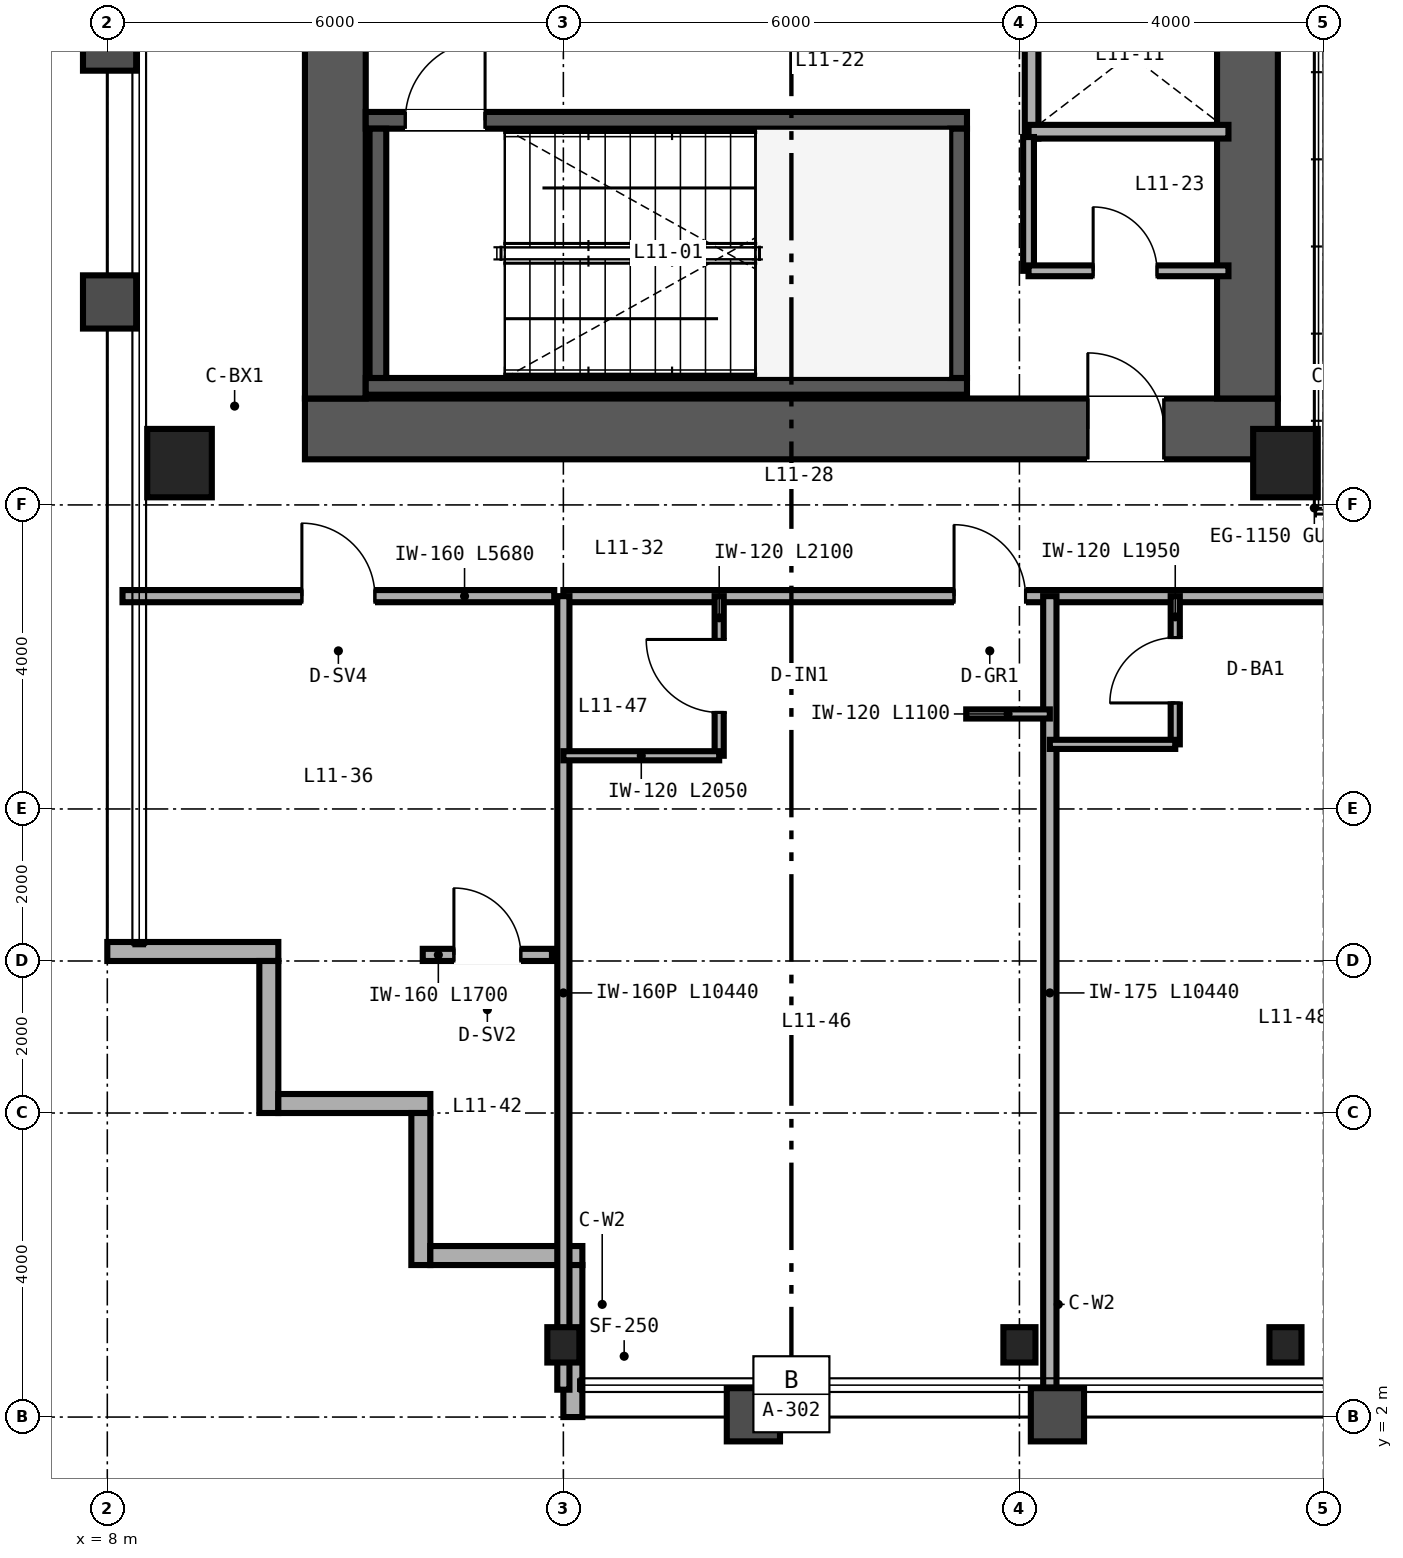
"""IFC4 building model, lengths in metres.
Left out: names, types, materials, properties, quantities, classifications, styles, units other than length and angle.
Written with IfcOpenShell. Run it as: python <this file> out.ifc"""

import sys

from ifc_helpers import new_model, si_unit, direction, frame, frame_2d, origin, origin_2d, place, context, subcontext, project, spatial, rectangle, hollow_rectangle, i_section, extrude, source, transform, mapped, element, fill, save


model = new_model("IFC4")
c1 = context("Model", 3, precision=1e-05, world=origin(), true_north=direction((0.0, 1.0)))
c2 = subcontext(c1, "Body", "Model", "MODEL_VIEW")
j1 = project(units=[si_unit("LENGTHUNIT", "METRE"), si_unit("PLANEANGLEUNIT", "RADIAN")], contexts=[c1])
p1 = place(None, origin())
s1 = spatial("IfcSite", under=j1, at=p1, CompositionType="ELEMENT")
p2 = place(p1, origin())
s2 = spatial("IfcBuilding", under=s1, at=p2, CompositionType="ELEMENT")
p3 = place(p2, frame((0.0, 0.0, 49.2)))
s3 = spatial("IfcBuildingStorey", under=s2, at=p3, CompositionType="ELEMENT", Elevation=49.2)
p4 = place(p3, frame((10.6, 15.0, 0.0), z_axis=(0.0, 0.0, 1.0), x_axis=(1.0, 0.0, 0.0)))
e1 = element("IfcWall", 1, at=p4, inside=s3, PredefinedType="SHEAR", context=c2, shape_type="SweptSolid", body=[
    extrude(rectangle(XDim=12.8, YDim=0.8, at=frame_2d((6.4, 0.0))), origin(), (0.0, 0.0, 1.0), 3.35),
])
p5 = place(p4, frame((10.3, 0.0, 0.0)))
e2 = element("IfcOpeningElement", 2, at=p5, cuts=e1, PredefinedType="OPENING", context=c2, shape_type="SweptSolid", body=[
    extrude(rectangle(XDim=1.0, YDim=2.15, at=frame_2d((0.5, 1.075))), frame((0.0, 0.41, 0.0), z_axis=(0.0, -1.0, 0.0), x_axis=(1.0, 0.0, 0.0)), (0.0, 0.0, 1.0), 0.82),
])
for number, where, z_axis, x_axis in (
    (3, (11.0, 15.4, 0.0), (0.0, 0.0, 1.0), (0.0, 1.0, 0.0)),
    (4, (23.0, 15.4, 0.0), (0.0, 0.0, 1.0), (0.0, 1.0, 0.0)),
):
    element("IfcWall", number, at=place(p3, frame(where, z_axis=z_axis, x_axis=x_axis)), inside=s3, PredefinedType="SHEAR", context=c2, shape_type="SweptSolid", body=[
        extrude(rectangle(XDim=21.2, YDim=0.8, at=frame_2d((10.6, 0.0))), origin(), (0.0, 0.0, 1.0), 3.35),
    ])
p6 = place(p3, frame((11.4, 15.56, 0.0), z_axis=(0.0, 0.0, 1.0), x_axis=(1.0, 0.0, 0.0)))
e5 = element("IfcWall", 5, at=p6, inside=s3, PredefinedType="SHEAR", context=c2, shape_type="SweptSolid", body=[
    extrude(rectangle(XDim=7.91, YDim=0.22, at=frame_2d((3.955, 0.0))), origin(), (0.0, 0.0, 1.0), 3.4),
])
p7 = place(p3, frame((11.4, 19.06, 0.0), z_axis=(0.0, 0.0, 1.0), x_axis=(1.0, 0.0, 0.0)))
e6 = element("IfcWall", 6, at=p7, inside=s3, PredefinedType="SHEAR", context=c2, shape_type="SweptSolid", body=[
    extrude(rectangle(XDim=7.91, YDim=0.22, at=frame_2d((3.955, 0.0))), origin(), (0.0, 0.0, 1.0), 3.4),
])
p8 = place(p7, frame((0.52, 0.0, 0.0)))
e7 = element("IfcOpeningElement", 7, at=p8, cuts=e6, PredefinedType="OPENING", context=c2, shape_type="SweptSolid", body=[
    extrude(rectangle(XDim=1.05, YDim=2.15, at=frame_2d((0.525, 1.075))), frame((0.0, 0.12, 0.0), z_axis=(0.0, -1.0, 0.0), x_axis=(1.0, 0.0, 0.0)), (0.0, 0.0, 1.0), 0.24),
])
for number, where, z_axis, x_axis in (
    (8, (11.56, 15.67, 0.0), (0.0, 0.0, 1.0), (0.0, 1.0, 0.0)),
    (9, (19.2, 15.67, 0.0), (0.0, 0.0, 1.0), (0.0, 1.0, 0.0)),
):
    element("IfcWall", number, at=place(p3, frame(where, z_axis=z_axis, x_axis=x_axis)), inside=s3, PredefinedType="SHEAR", context=c2, shape_type="SweptSolid", body=[
        extrude(rectangle(XDim=3.28, YDim=0.22, at=frame_2d((1.64, 0.0))), origin(), (0.0, 0.0, 1.0), 3.4),
    ])
m1 = source(origin(), c2, "Body", "SweptSolid", [
    extrude(hollow_rectangle(XDim=0.85, YDim=0.9, WallThickness=0.04, at=origin_2d()), origin(), (0.0, 0.0, 1.0), 3.35),
])
for number, where, z_axis, x_axis in (
    (10, (8.95, 14.55, 0.0), (0.0, 0.0, 1.0), (1.0, 0.0, 0.0)),
    (11, (23.5, 14.55, 0.0), (0.0, 0.0, 1.0), (1.0, 0.0, 0.0)),
):
    element("IfcColumn", number, at=place(p3, frame(where, z_axis=z_axis, x_axis=x_axis)), inside=s3, PredefinedType="COLUMN", context=c2, shape_type="MappedRepresentation", body=[
        mapped(m1, transform((0.0, 0.0, 0.0), scale=1.0)),
    ])
m2 = source(origin(), c2, "Body", "SweptSolid", [
    extrude(i_section(OverallWidth=0.422, OverallDepth=0.465, WebThickness=0.045, FlangeThickness=0.073, FilletRadius=0.025, at=origin_2d()), origin(), (0.0, 0.0, 1.0), 3.35),
])
for number, where, z_axis, x_axis in (
    (12, (14.0, 2.95, 0.0), (0.0, 0.0, 1.0), (1.0, 0.0, 0.0)),
    (13, (20.0, 2.95, 0.0), (0.0, 0.0, 1.0), (1.0, 0.0, 0.0)),
    (14, (23.5, 2.95, 0.0), (0.0, 0.0, 1.0), (1.0, 0.0, 0.0)),
):
    element("IfcColumn", number, at=place(p3, frame(where, z_axis=z_axis, x_axis=x_axis)), inside=s3, PredefinedType="COLUMN", context=c2, shape_type="MappedRepresentation", body=[
        mapped(m2, transform((0.0, 0.0, 0.0), scale=1.0)),
    ])
p9 = place(p3, frame((8.0, 8.125, 0.0), z_axis=(0.0, 0.0, 1.0), x_axis=(1.0, 0.0, 0.0)))
e15 = element("IfcWall", 15, at=p9, inside=s3, PredefinedType="SOLIDWALL", context=c2, shape_type="SweptSolid", body=[
    extrude(rectangle(XDim=2.25, YDim=0.25, at=frame_2d((1.125, 0.0))), origin(), (0.0, 0.0, 1.0), 3.35),
])
for number, where, z_axis, x_axis in (
    (16, (10.125, 8.0, 0.0), (0.0, 0.0, 1.0), (0.0, -1.0, 0.0)),
    (17, (10.25, 6.125, 0.0), (0.0, 0.0, 1.0), (1.0, 0.0, 0.0)),
    (18, (12.125, 6.0, 0.0), (0.0, 0.0, 1.0), (0.0, -1.0, 0.0)),
    (19, (12.25, 4.125, 0.0), (0.0, 0.0, 1.0), (1.0, 0.0, 0.0)),
):
    element("IfcWall", number, at=place(p3, frame(where, z_axis=z_axis, x_axis=x_axis)), inside=s3, PredefinedType="SOLIDWALL", context=c2, shape_type="SweptSolid", body=[
        extrude(rectangle(XDim=2.0, YDim=0.25, at=frame_2d((1.0, 0.0))), origin(), (0.0, 0.0, 1.0), 3.35),
    ])
p10 = place(p3, frame((14.125, 4.0, 0.0), z_axis=(0.0, 0.0, 1.0), x_axis=(0.0, -1.0, 0.0)))
e20 = element("IfcWall", 20, at=p10, inside=s3, PredefinedType="SOLIDWALL", context=c2, shape_type="SweptSolid", body=[
    extrude(rectangle(XDim=2.0, YDim=0.25, at=frame_2d((1.0, 0.0))), origin(), (0.0, 0.0, 1.0), 2.657),
])
p11 = place(p3, frame((20.16, 18.82, 0.0), z_axis=(0.0, 0.0, 1.0), x_axis=(0.0, 1.0, 0.0)))
e21 = element("IfcWall", 21, at=p11, inside=s3, PredefinedType="SOLIDWALL", context=c2, shape_type="SweptSolid", body=[
    extrude(rectangle(XDim=6.32, YDim=0.18, at=frame_2d((3.16, 0.0))), origin(), (0.0, 0.0, 1.0), 2.36),
])
p12 = place(p3, frame((20.12, 18.91, 0.0), z_axis=(0.0, 0.0, 1.0), x_axis=(1.0, 0.0, 0.0)))
e22 = element("IfcWall", 22, at=p12, inside=s3, PredefinedType="SOLIDWALL", context=c2, shape_type="SweptSolid", body=[
    extrude(rectangle(XDim=2.63, YDim=0.18, at=frame_2d((1.315, 0.0))), origin(), (0.0, 0.0, 1.0), 3.35),
])
p13 = place(p3, frame((20.12, 17.08, 0.0), z_axis=(0.0, 0.0, 1.0), x_axis=(0.0, 1.0, 0.0)))
e23 = element("IfcWall", 23, at=p13, inside=s3, PredefinedType="PARTITIONING", context=c2, shape_type="SweptSolid", body=[
    extrude(rectangle(XDim=1.76, YDim=0.142, at=frame_2d((0.88, 0.0))), origin(), (0.0, 0.0, 1.0), 3.35),
])
p14 = place(p3, frame((20.12, 17.08, 0.0), z_axis=(0.0, 0.0, 1.0), x_axis=(1.0, 0.0, 0.0)))
e24 = element("IfcWall", 24, at=p14, inside=s3, PredefinedType="PARTITIONING", context=c2, shape_type="SweptSolid", body=[
    extrude(rectangle(XDim=2.63, YDim=0.142, at=frame_2d((1.315, 0.0))), origin(), (0.0, 0.0, 1.0), 3.35),
])
p15 = place(p14, frame((0.85, 0.0, 0.0)))
e25 = element("IfcOpeningElement", 25, at=p15, cuts=e24, PredefinedType="OPENING", context=c2, shape_type="SweptSolid", body=[
    extrude(rectangle(XDim=0.84, YDim=2.1, at=frame_2d((0.42, 1.05))), frame((0.0, 0.081, 0.0), z_axis=(0.0, -1.0, 0.0), x_axis=(1.0, 0.0, 0.0)), (0.0, 0.0, 1.0), 0.162),
])
p16 = place(p3, frame((8.2, 12.8, 0.0), z_axis=(0.0, 0.0, 1.0), x_axis=(1.0, 0.0, 0.0)))
e26 = element("IfcWall", 26, at=p16, inside=s3, PredefinedType="PARTITIONING", context=c2, shape_type="SweptSolid", body=[
    extrude(rectangle(XDim=5.68, YDim=0.16, at=frame_2d((2.84, 0.0))), origin(), (0.0, 0.0, 1.0), 3.35),
])
p17 = place(p16, frame((2.36, 0.0, 0.0)))
e27 = element("IfcOpeningElement", 27, at=p17, cuts=e26, PredefinedType="OPENING", context=c2, shape_type="SweptSolid", body=[
    extrude(rectangle(XDim=0.96, YDim=2.15, at=frame_2d((0.48, 1.075))), frame((0.0, 0.09, 0.0), z_axis=(0.0, -1.0, 0.0), x_axis=(1.0, 0.0, 0.0)), (0.0, 0.0, 1.0), 0.18),
])
p18 = place(p3, frame((12.15, 8.08, 0.0), z_axis=(0.0, 0.0, 1.0), x_axis=(1.0, 0.0, 0.0)))
e28 = element("IfcWall", 28, at=p18, inside=s3, PredefinedType="PARTITIONING", context=c2, shape_type="SweptSolid", body=[
    extrude(rectangle(XDim=1.7, YDim=0.16, at=frame_2d((0.85, 0.0))), origin(), (0.0, 0.0, 1.0), 3.35),
])
p19 = place(p18, frame((0.41, 0.0, 0.0)))
e29 = element("IfcOpeningElement", 29, at=p19, cuts=e28, PredefinedType="OPENING", context=c2, shape_type="SweptSolid", body=[
    extrude(rectangle(XDim=0.88, YDim=2.15, at=frame_2d((0.44, 1.075))), frame((0.0, 0.09, 0.0), z_axis=(0.0, -1.0, 0.0), x_axis=(1.0, 0.0, 0.0)), (0.0, 0.0, 1.0), 0.18),
])
p20 = place(p3, frame((14.0, 12.8, 0.0), z_axis=(0.0, 0.0, 1.0), x_axis=(1.0, 0.0, 0.0)))
e30 = element("IfcWall", 30, at=p20, inside=s3, PredefinedType="PARTITIONING", context=c2, shape_type="SweptSolid", body=[
    extrude(rectangle(XDim=36.0, YDim=0.16, at=frame_2d((18.0, 0.0))), origin(), (0.0, 0.0, 1.0), 2.571),
])
p21 = place(p20, frame((5.14, 0.0, 0.0)))
e31 = element("IfcOpeningElement", 31, at=p21, cuts=e30, PredefinedType="OPENING", context=c2, shape_type="SweptSolid", body=[
    extrude(rectangle(XDim=0.94, YDim=2.15, at=frame_2d((0.47, 1.075))), frame((0.0, 0.09, 0.0), z_axis=(0.0, -1.0, 0.0), x_axis=(1.0, 0.0, 0.0)), (0.0, 0.0, 1.0), 0.18),
])
p22 = place(p20, frame((11.34, 0.0, 0.0)))
e32 = element("IfcOpeningElement", 32, at=p22, cuts=e30, PredefinedType="OPENING", context=c2, shape_type="SweptSolid", body=[
    extrude(rectangle(XDim=0.94, YDim=2.15, at=frame_2d((0.47, 1.075))), frame((0.0, 0.09, 0.0), z_axis=(0.0, -1.0, 0.0), x_axis=(1.0, 0.0, 0.0)), (0.0, 0.0, 1.0), 0.18),
])
p23 = place(p20, frame((17.94, 0.0, 0.0)))
e33 = element("IfcOpeningElement", 33, at=p23, cuts=e30, PredefinedType="OPENING", context=c2, shape_type="SweptSolid", body=[
    extrude(rectangle(XDim=0.94, YDim=2.15, at=frame_2d((0.47, 1.075))), frame((0.0, 0.09, 0.0), z_axis=(0.0, -1.0, 0.0), x_axis=(1.0, 0.0, 0.0)), (0.0, 0.0, 1.0), 0.18),
])
p24 = place(p20, frame((21.82, 0.0, 0.0)))
e34 = element("IfcOpeningElement", 34, at=p24, cuts=e30, PredefinedType="OPENING", context=c2, shape_type="SweptSolid", body=[
    extrude(rectangle(XDim=0.96, YDim=2.15, at=frame_2d((0.48, 1.075))), frame((0.0, 0.09, 0.0), z_axis=(0.0, -1.0, 0.0), x_axis=(1.0, 0.0, 0.0)), (0.0, 0.0, 1.0), 0.18),
])
p25 = place(p20, frame((29.54, 0.0, 0.0)))
e35 = element("IfcOpeningElement", 35, at=p25, cuts=e30, PredefinedType="OPENING", context=c2, shape_type="SweptSolid", body=[
    extrude(rectangle(XDim=0.94, YDim=2.15, at=frame_2d((0.47, 1.075))), frame((0.0, 0.09, 0.0), z_axis=(0.0, -1.0, 0.0), x_axis=(1.0, 0.0, 0.0)), (0.0, 0.0, 1.0), 0.18),
])
p26 = place(p20, frame((32.92, 0.0, 0.0)))
e36 = element("IfcOpeningElement", 36, at=p26, cuts=e30, PredefinedType="OPENING", context=c2, shape_type="SweptSolid", body=[
    extrude(rectangle(XDim=0.96, YDim=2.15, at=frame_2d((0.48, 1.075))), frame((0.0, 0.09, 0.0), z_axis=(0.0, -1.0, 0.0), x_axis=(1.0, 0.0, 0.0)), (0.0, 0.0, 1.0), 0.18),
])
p27 = place(p3, frame((14.0, 2.36, 0.0), z_axis=(0.0, 0.0, 1.0), x_axis=(0.0, 1.0, 0.0)))
e37 = element("IfcWall", 37, at=p27, inside=s3, PredefinedType="PARTITIONING", context=c2, shape_type="SweptSolid", body=[
    extrude(rectangle(XDim=10.44, YDim=0.16, at=frame_2d((5.22, 0.0))), origin(), (0.0, 0.0, 1.0), 2.657),
])
p28 = place(p3, frame((20.4, 2.36, 0.0), z_axis=(0.0, 0.0, 1.0), x_axis=(0.0, 1.0, 0.0)))
e38 = element("IfcWall", 38, at=p28, inside=s3, PredefinedType="PARTITIONING", context=c2, shape_type="SweptSolid", body=[
    extrude(rectangle(XDim=10.44, YDim=0.175, at=frame_2d((5.22, 0.0))), origin(), (0.0, 0.0, 1.0), 2.813),
])
p29 = place(p3, frame((16.05, 10.7, 0.0), z_axis=(0.0, 0.0, 1.0), x_axis=(0.0, 1.0, 0.0)))
e39 = element("IfcWall", 39, at=p29, inside=s3, PredefinedType="PARTITIONING", context=c2, shape_type="SweptSolid", body=[
    extrude(rectangle(XDim=2.1, YDim=0.12, at=frame_2d((1.05, 0.0))), origin(), (0.0, 0.0, 1.0), 3.35),
])
p30 = place(p29, frame((0.57, 0.0, 0.0)))
e40 = element("IfcOpeningElement", 40, at=p30, cuts=e39, PredefinedType="OPENING", context=c2, shape_type="SweptSolid", body=[
    extrude(rectangle(XDim=0.96, YDim=2.15, at=frame_2d((0.48, 1.075))), frame((0.0, 0.07, 0.0), z_axis=(0.0, -1.0, 0.0), x_axis=(1.0, 0.0, 0.0)), (0.0, 0.0, 1.0), 0.14),
])
p31 = place(p3, frame((14.0, 10.7, 0.0), z_axis=(0.0, 0.0, 1.0), x_axis=(1.0, 0.0, 0.0)))
e41 = element("IfcWall", 41, at=p31, inside=s3, PredefinedType="PARTITIONING", context=c2, shape_type="SweptSolid", body=[
    extrude(rectangle(XDim=2.05, YDim=0.12, at=frame_2d((1.025, 0.0))), origin(), (0.0, 0.0, 1.0), 3.35),
])
p32 = place(p3, frame((19.3, 11.25, 0.0), z_axis=(0.0, 0.0, 1.0), x_axis=(1.0, 0.0, 0.0)))
e42 = element("IfcWall", 42, at=p32, inside=s3, PredefinedType="PARTITIONING", context=c2, shape_type="SweptSolid", body=[
    extrude(rectangle(XDim=1.1, YDim=0.12, at=frame_2d((0.55, 0.0))), origin(), (0.0, 0.0, 1.0), 3.35),
])
p33 = place(p3, frame((22.05, 10.85, 0.0), z_axis=(0.0, 0.0, 1.0), x_axis=(0.0, 1.0, 0.0)))
e43 = element("IfcWall", 43, at=p33, inside=s3, PredefinedType="PARTITIONING", context=c2, shape_type="SweptSolid", body=[
    extrude(rectangle(XDim=1.95, YDim=0.12, at=frame_2d((0.975, 0.0))), origin(), (0.0, 0.0, 1.0), 3.35),
])
p34 = place(p33, frame((0.545, 0.0, 0.0)))
e44 = element("IfcOpeningElement", 44, at=p34, cuts=e43, PredefinedType="OPENING", context=c2, shape_type="SweptSolid", body=[
    extrude(rectangle(XDim=0.86, YDim=2.1, at=frame_2d((0.43, 1.05))), frame((0.0, 0.07, 0.0), z_axis=(0.0, -1.0, 0.0), x_axis=(1.0, 0.0, 0.0)), (0.0, 0.0, 1.0), 0.14),
])
p35 = place(p3, frame((20.4, 10.85, 0.0), z_axis=(0.0, 0.0, 1.0), x_axis=(1.0, 0.0, 0.0)))
e45 = element("IfcWall", 45, at=p35, inside=s3, PredefinedType="PARTITIONING", context=c2, shape_type="SweptSolid", body=[
    extrude(rectangle(XDim=1.65, YDim=0.12, at=frame_2d((0.825, 0.0))), origin(), (0.0, 0.0, 1.0), 3.35),
])
m3 = source(origin(), c2, "Body", "SweptSolid", [
    extrude(rectangle(XDim=1.05, YDim=2.15, at=frame_2d((0.525, 1.075))), frame((0.0, 0.025, 0.0), z_axis=(0.0, -1.0, 0.0), x_axis=(1.0, 0.0, 0.0)), (0.0, 0.0, 1.0), 0.05),
])
p36 = place(p8, origin())
e46 = element("IfcDoor", 46, at=p36, inside=s3, OperationType="SINGLE_SWING_RIGHT", PredefinedType="DOOR", context=c2, shape_type="MappedRepresentation", body=[
    mapped(m3, transform((0.0, 0.0, 0.0), scale=1.0)),
])
fill(e7, e46)
m4 = source(origin(), c2, "Body", "SweptSolid", [
    extrude(rectangle(XDim=0.84, YDim=2.1, at=frame_2d((0.42, 1.05))), frame((0.0, 0.025, 0.0), z_axis=(0.0, -1.0, 0.0), x_axis=(1.0, 0.0, 0.0)), (0.0, 0.0, 1.0), 0.05),
])
p37 = place(p15, origin())
e47 = element("IfcDoor", 47, at=p37, inside=s3, OperationType="SINGLE_SWING_LEFT", PredefinedType="DOOR", context=c2, shape_type="MappedRepresentation", body=[
    mapped(m4, transform((0.0, 0.0, 0.0), scale=1.0)),
])
fill(e25, e47)
m5 = source(origin(), c2, "Body", "SweptSolid", [
    extrude(rectangle(XDim=1.0, YDim=2.15, at=frame_2d((0.5, 1.075))), frame((0.0, 0.025, 0.0), z_axis=(0.0, -1.0, 0.0), x_axis=(1.0, 0.0, 0.0)), (0.0, 0.0, 1.0), 0.05),
])
p38 = place(p5, origin())
e48 = element("IfcDoor", 48, at=p38, inside=s3, OperationType="SINGLE_SWING_LEFT", PredefinedType="DOOR", context=c2, shape_type="MappedRepresentation", body=[
    mapped(m5, transform((0.0, 0.0, 0.0), scale=1.0)),
])
fill(e2, e48)
m6 = source(origin(), c2, "Body", "SweptSolid", [
    extrude(rectangle(XDim=0.96, YDim=2.15, at=frame_2d((0.48, 1.075))), frame((0.0, 0.025, 0.0), z_axis=(0.0, -1.0, 0.0), x_axis=(1.0, 0.0, 0.0)), (0.0, 0.0, 1.0), 0.05),
])
p39 = place(p17, origin())
e49 = element("IfcDoor", 49, at=p39, inside=s3, OperationType="SINGLE_SWING_LEFT", PredefinedType="DOOR", context=c2, shape_type="MappedRepresentation", body=[
    mapped(m6, transform((0.0, 0.0, 0.0), scale=1.0)),
])
fill(e27, e49)
m7 = source(origin(), c2, "Body", "SweptSolid", [
    extrude(rectangle(XDim=0.88, YDim=2.15, at=frame_2d((0.44, 1.075))), frame((0.0, 0.025, 0.0), z_axis=(0.0, -1.0, 0.0), x_axis=(1.0, 0.0, 0.0)), (0.0, 0.0, 1.0), 0.05),
])
p40 = place(p19, origin())
e50 = element("IfcDoor", 50, at=p40, inside=s3, OperationType="SINGLE_SWING_LEFT", PredefinedType="DOOR", context=c2, shape_type="MappedRepresentation", body=[
    mapped(m7, transform((0.0, 0.0, 0.0), scale=1.0)),
])
fill(e29, e50)
p41 = place(p30, origin())
e51 = element("IfcDoor", 51, at=p41, inside=s3, OperationType="SINGLE_SWING_RIGHT", PredefinedType="DOOR", context=c2, shape_type="MappedRepresentation", body=[
    mapped(m6, transform((0.0, 0.0, 0.0), scale=1.0)),
])
fill(e40, e51)
m8 = source(origin(), c2, "Body", "SweptSolid", [
    extrude(rectangle(XDim=0.86, YDim=2.1, at=frame_2d((0.43, 1.05))), frame((0.0, 0.025, 0.0), z_axis=(0.0, -1.0, 0.0), x_axis=(1.0, 0.0, 0.0)), (0.0, 0.0, 1.0), 0.05),
])
p42 = place(p34, origin())
e52 = element("IfcDoor", 52, at=p42, inside=s3, OperationType="SINGLE_SWING_LEFT", PredefinedType="DOOR", context=c2, shape_type="MappedRepresentation", body=[
    mapped(m8, transform((0.0, 0.0, 0.0), scale=1.0)),
])
fill(e44, e52)
m9 = source(origin(), c2, "Body", "SweptSolid", [
    extrude(rectangle(XDim=0.94, YDim=2.15, at=frame_2d((0.47, 1.075))), frame((0.0, 0.025, 0.0), z_axis=(0.0, -1.0, 0.0), x_axis=(1.0, 0.0, 0.0)), (0.0, 0.0, 1.0), 0.05),
])
p43 = place(p21, origin())
e53 = element("IfcDoor", 53, at=p43, inside=s3, OperationType="SINGLE_SWING_LEFT", PredefinedType="DOOR", context=c2, shape_type="MappedRepresentation", body=[
    mapped(m9, transform((0.0, 0.0, 0.0), scale=1.0)),
])
fill(e31, e53)
save(model, sys.argv[1])
